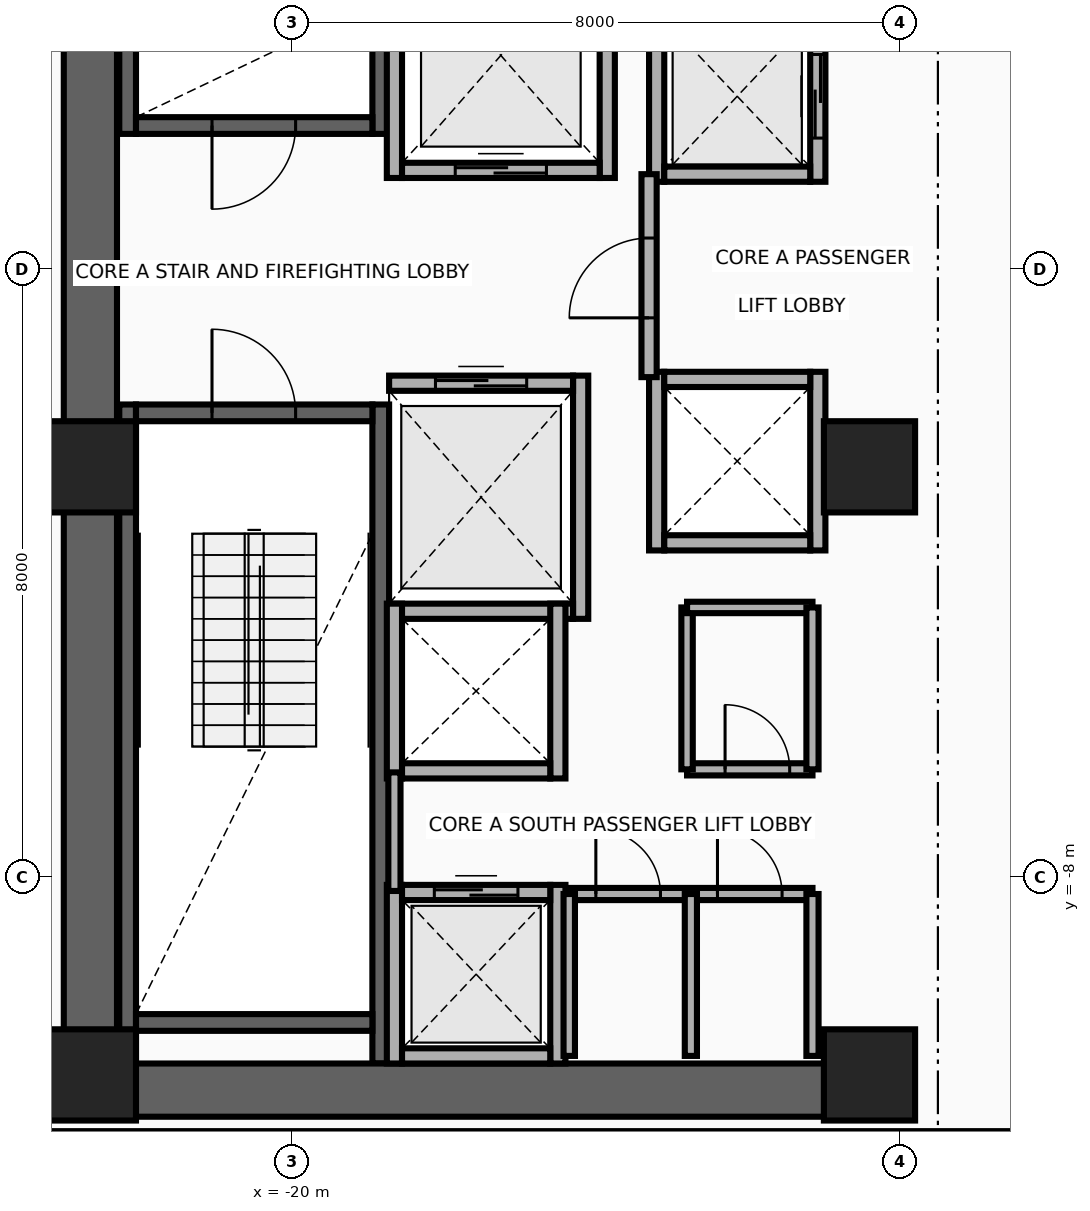
"""IFC4 building model, lengths in metres.
Left out: names, types, materials, properties, quantities, classifications, styles, units other than length and angle.
Written with IfcOpenShell. Run it as: python <this file> out.ifc"""

import sys

from ifc_helpers import new_model, si_unit, direction, frame, frame_2d, origin, origin_2d, place, context, subcontext, project, spatial, rectangle, extrude, source, transform, mapped, element, fill, save


model = new_model("IFC4")
c1 = context("Model", 3, precision=1e-05, world=origin(), true_north=direction((0.0, 1.0)))
c2 = subcontext(c1, "Body", "Model", "MODEL_VIEW")
j1 = project(units=[si_unit("LENGTHUNIT", "METRE"), si_unit("PLANEANGLEUNIT", "RADIAN")], contexts=[c1])
p1 = place(None, origin())
s1 = spatial("IfcSite", under=j1, at=p1, CompositionType="ELEMENT")
p2 = place(p1, origin())
s2 = spatial("IfcBuilding", under=s1, at=p2, CompositionType="ELEMENT")
p3 = place(p2, frame((0.0, 0.0, 124.2)))
s3 = spatial("IfcBuildingStorey", under=s2, at=p3, CompositionType="ELEMENT", Elevation=124.2)
for number, where, z_axis, x_axis in (
    (1, (-22.16, 1.78, 0.0), (0.0, 0.0, 1.0), (0.0, 1.0, 0.0)),
    (2, (-18.83, 1.78, 0.0), (0.0, 0.0, 1.0), (0.0, 1.0, 0.0)),
):
    element("IfcWall", number, at=place(p3, frame(where, z_axis=z_axis, x_axis=x_axis)), inside=s3, PredefinedType="SHEAR", context=c2, shape_type="SweptSolid", body=[
        extrude(rectangle(XDim=8.67, YDim=0.22, at=frame_2d((4.335, 0.0))), origin(), (0.0, 0.0, 1.0), 3.46),
    ])
p4 = place(p3, frame((-22.05, 1.89, 0.0), z_axis=(0.0, 0.0, 1.0), x_axis=(1.0, 0.0, 0.0)))
e3 = element("IfcWall", 3, at=p4, inside=s3, PredefinedType="SHEAR", context=c2, shape_type="SweptSolid", body=[
    extrude(rectangle(XDim=3.11, YDim=0.22, at=frame_2d((1.555, 0.0))), origin(), (0.0, 0.0, 1.0), 3.46),
])
p5 = place(p4, frame((1.0, 0.0, 0.0)))
e4 = element("IfcOpeningElement", 4, at=p5, cuts=e3, PredefinedType="OPENING", context=c2, shape_type="SweptSolid", body=[
    extrude(rectangle(XDim=1.1, YDim=2.15, at=frame_2d((0.55, 1.075))), frame((0.0, 0.125, 0.0), z_axis=(0.0, -1.0, 0.0), x_axis=(1.0, 0.0, 0.0)), (0.0, 0.0, 1.0), 0.25),
])
for number, where, z_axis, x_axis in (
    (5, (-22.16, -10.45, 0.0), (0.0, 0.0, 1.0), (0.0, 1.0, 0.0)),
    (6, (-18.83, -10.45, 0.0), (0.0, 0.0, 1.0), (0.0, 1.0, 0.0)),
):
    element("IfcWall", number, at=place(p3, frame(where, z_axis=z_axis, x_axis=x_axis)), inside=s3, PredefinedType="SHEAR", context=c2, shape_type="SweptSolid", body=[
        extrude(rectangle(XDim=8.67, YDim=0.22, at=frame_2d((4.335, 0.0))), origin(), (0.0, 0.0, 1.0), 3.46),
    ])
p6 = place(p3, frame((-22.05, -9.91, 0.0), z_axis=(0.0, 0.0, 1.0), x_axis=(1.0, 0.0, 0.0)))
e7 = element("IfcWall", 7, at=p6, inside=s3, PredefinedType="SHEAR", context=c2, shape_type="SweptSolid", body=[
    extrude(rectangle(XDim=3.11, YDim=0.22, at=frame_2d((1.555, 0.0))), origin(), (0.0, 0.0, 1.0), 3.46),
])
p7 = place(p3, frame((-22.05, -1.89, 0.0), z_axis=(0.0, 0.0, 1.0), x_axis=(1.0, 0.0, 0.0)))
e8 = element("IfcWall", 8, at=p7, inside=s3, PredefinedType="SHEAR", context=c2, shape_type="SweptSolid", body=[
    extrude(rectangle(XDim=3.11, YDim=0.22, at=frame_2d((1.555, 0.0))), origin(), (0.0, 0.0, 1.0), 3.46),
])
p8 = place(p7, frame((1.0, 0.0, 0.0)))
e9 = element("IfcOpeningElement", 9, at=p8, cuts=e8, PredefinedType="OPENING", context=c2, shape_type="SweptSolid", body=[
    extrude(rectangle(XDim=1.1, YDim=2.15, at=frame_2d((0.55, 1.075))), frame((0.0, 0.125, 0.0), z_axis=(0.0, -1.0, 0.0), x_axis=(1.0, 0.0, 0.0)), (0.0, 0.0, 1.0), 0.25),
])
p9 = place(p3, frame((-22.65, -11.15, 0.0), z_axis=(0.0, 0.0, 1.0), x_axis=(0.0, 1.0, 0.0)))
e10 = element("IfcWall", 10, at=p9, inside=s3, PredefinedType="SHEAR", context=c2, shape_type="SweptSolid", body=[
    extrude(rectangle(XDim=22.3, YDim=0.7, at=frame_2d((11.15, 0.0))), origin(), (0.0, 0.0, 1.0), 3.46),
])
p10 = place(p3, frame((-22.65, -10.8, 0.0), z_axis=(0.0, 0.0, 1.0), x_axis=(1.0, 0.0, 0.0)))
e11 = element("IfcWall", 11, at=p10, inside=s3, PredefinedType="SHEAR", context=c2, shape_type="SweptSolid", body=[
    extrude(rectangle(XDim=10.25, YDim=0.7, at=frame_2d((5.125, 0.0))), origin(), (0.0, 0.0, 1.0), 3.46),
])
m1 = source(origin(), c2, "Body", "SweptSolid", [
    extrude(rectangle(XDim=1.2, YDim=1.2, at=origin_2d()), origin(), (0.0, 0.0, 1.0), 3.7),
])
for number, where, z_axis, x_axis in (
    (12, (-22.65, -10.6, 0.0), (0.0, 0.0, 1.0), (1.0, 0.0, 0.0)),
    (13, (-12.4, -10.6, 0.0), (0.0, 0.0, 1.0), (1.0, 0.0, 0.0)),
    (14, (-22.65, -2.6, 0.0), (0.0, 0.0, 1.0), (1.0, 0.0, 0.0)),
    (15, (-12.4, -2.6, 0.0), (0.0, 0.0, 1.0), (1.0, 0.0, 0.0)),
):
    element("IfcColumn", number, at=place(p3, frame(where, z_axis=z_axis, x_axis=x_axis)), inside=s3, PredefinedType="COLUMN", context=c2, shape_type="MappedRepresentation", body=[
        mapped(m1, transform((0.0, 0.0, 0.0), x_axis=(1.0, 0.0, 0.0), y_axis=(0.0, 1.0, 0.0), z_axis=(0.0, 0.0, 1.0), scale=1.0)),
    ])
for number, where, z_axis, x_axis in (
    (16, (-18.65, 1.2, 0.0), (0.0, 0.0, 1.0), (0.0, 1.0, 0.0)),
    (17, (-15.85, 1.2, 0.0), (0.0, 0.0, 1.0), (0.0, 1.0, 0.0)),
):
    element("IfcWall", number, at=place(p3, frame(where, z_axis=z_axis, x_axis=x_axis)), inside=s3, PredefinedType="MOVABLE", context=c2, shape_type="SweptSolid", body=[
        extrude(rectangle(XDim=3.225, YDim=0.2, at=frame_2d((1.613, 0.0))), origin(), (0.0, 0.0, 1.0), 3.46),
    ])
p11 = place(p3, frame((-18.55, 1.3, 0.0), z_axis=(0.0, 0.0, 1.0), x_axis=(1.0, 0.0, 0.0)))
e18 = element("IfcWall", 18, at=p11, inside=s3, PredefinedType="MOVABLE", context=c2, shape_type="SweptSolid", body=[
    extrude(rectangle(XDim=2.6, YDim=0.2, at=frame_2d((1.3, 0.0))), origin(), (0.0, 0.0, 1.0), 3.46),
])
p12 = place(p11, frame((0.7, 0.0, 0.0)))
e19 = element("IfcOpeningElement", 19, at=p12, cuts=e18, PredefinedType="OPENING", context=c2, shape_type="SweptSolid", body=[
    extrude(rectangle(XDim=1.2, YDim=2.1, at=frame_2d((0.6, 1.05))), frame((0.0, 0.115, 0.0), z_axis=(0.0, -1.0, 0.0), x_axis=(1.0, 0.0, 0.0)), (0.0, 0.0, 1.0), 0.23),
])
p13 = place(p3, frame((-16.2, -4.6, 0.0), z_axis=(0.0, 0.0, 1.0), x_axis=(0.0, 1.0, 0.0)))
e20 = element("IfcWall", 20, at=p13, inside=s3, PredefinedType="MOVABLE", context=c2, shape_type="SweptSolid", body=[
    extrude(rectangle(XDim=3.2, YDim=0.2, at=frame_2d((1.6, 0.0))), origin(), (0.0, 0.0, 1.0), 3.46),
])
p14 = place(p3, frame((-18.72, -4.5, 0.0), z_axis=(0.0, 0.0, 1.0), x_axis=(1.0, 0.0, 0.0)))
e21 = element("IfcWall", 21, at=p14, inside=s3, PredefinedType="MOVABLE", context=c2, shape_type="SweptSolid", body=[
    extrude(rectangle(XDim=2.42, YDim=0.2, at=frame_2d((1.21, 0.0))), origin(), (0.0, 0.0, 1.0), 3.46),
])
p15 = place(p3, frame((-18.72, -1.5, 0.0), z_axis=(0.0, 0.0, 1.0), x_axis=(1.0, 0.0, 0.0)))
e22 = element("IfcWall", 22, at=p15, inside=s3, PredefinedType="MOVABLE", context=c2, shape_type="SweptSolid", body=[
    extrude(rectangle(XDim=2.42, YDim=0.2, at=frame_2d((1.21, 0.0))), origin(), (0.0, 0.0, 1.0), 3.46),
])
p16 = place(p15, frame((0.61, 0.0, 0.0)))
e23 = element("IfcOpeningElement", 23, at=p16, cuts=e22, PredefinedType="OPENING", context=c2, shape_type="SweptSolid", body=[
    extrude(rectangle(XDim=1.2, YDim=2.1, at=frame_2d((0.6, 1.05))), frame((0.0, 0.115, 0.0), z_axis=(0.0, -1.0, 0.0), x_axis=(1.0, 0.0, 0.0)), (0.0, 0.0, 1.0), 0.23),
])
for number, where, z_axis, x_axis in (
    (24, (-18.65, -10.45, 0.0), (0.0, 0.0, 1.0), (0.0, 1.0, 0.0)),
    (25, (-16.5, -10.45, 0.0), (0.0, 0.0, 1.0), (0.0, 1.0, 0.0)),
):
    element("IfcWall", number, at=place(p3, frame(where, z_axis=z_axis, x_axis=x_axis)), inside=s3, PredefinedType="MOVABLE", context=c2, shape_type="SweptSolid", body=[
        extrude(rectangle(XDim=2.35, YDim=0.2, at=frame_2d((1.175, 0.0))), origin(), (0.0, 0.0, 1.0), 2.666),
    ])
p17 = place(p3, frame((-18.55, -10.35, 0.0), z_axis=(0.0, 0.0, 1.0), x_axis=(1.0, 0.0, 0.0)))
e26 = element("IfcWall", 26, at=p17, inside=s3, PredefinedType="MOVABLE", context=c2, shape_type="SweptSolid", body=[
    extrude(rectangle(XDim=1.95, YDim=0.2, at=frame_2d((0.975, 0.0))), origin(), (0.0, 0.0, 1.0), 2.666),
])
p18 = place(p3, frame((-18.55, -8.2, 0.0), z_axis=(0.0, 0.0, 1.0), x_axis=(1.0, 0.0, 0.0)))
e27 = element("IfcWall", 27, at=p18, inside=s3, PredefinedType="MOVABLE", context=c2, shape_type="SweptSolid", body=[
    extrude(rectangle(XDim=1.95, YDim=0.2, at=frame_2d((0.975, 0.0))), origin(), (0.0, 0.0, 1.0), 3.46),
])
p19 = place(p18, frame((0.425, 0.0, 0.0)))
e28 = element("IfcOpeningElement", 28, at=p19, cuts=e27, PredefinedType="OPENING", context=c2, shape_type="SweptSolid", body=[
    extrude(rectangle(XDim=1.1, YDim=2.1, at=frame_2d((0.55, 1.05))), frame((0.0, 0.115, 0.0), z_axis=(0.0, -1.0, 0.0), x_axis=(1.0, 0.0, 0.0)), (0.0, 0.0, 1.0), 0.23),
])
p20 = place(p3, frame((-15.2, 1.15, 0.0), z_axis=(0.0, 0.0, 1.0), x_axis=(0.0, 1.0, 0.0)))
e29 = element("IfcWall", 29, at=p20, inside=s3, PredefinedType="MOVABLE", context=c2, shape_type="SweptSolid", body=[
    extrude(rectangle(XDim=2.25, YDim=0.2, at=frame_2d((1.125, 0.0))), origin(), (0.0, 0.0, 1.0), 3.46),
])
p21 = place(p3, frame((-13.08, 1.15, 0.0), z_axis=(0.0, 0.0, 1.0), x_axis=(0.0, 1.0, 0.0)))
e30 = element("IfcWall", 30, at=p21, inside=s3, PredefinedType="MOVABLE", context=c2, shape_type="SweptSolid", body=[
    extrude(rectangle(XDim=2.25, YDim=0.2, at=frame_2d((1.125, 0.0))), origin(), (0.0, 0.0, 1.0), 3.46),
])
p22 = place(p21, frame((0.575, 0.0, 0.0)))
e31 = element("IfcOpeningElement", 31, at=p22, cuts=e30, PredefinedType="OPENING", context=c2, shape_type="SweptSolid", body=[
    extrude(rectangle(XDim=1.1, YDim=2.1, at=frame_2d((0.55, 1.05))), frame((0.0, 0.115, 0.0), z_axis=(0.0, -1.0, 0.0), x_axis=(1.0, 0.0, 0.0)), (0.0, 0.0, 1.0), 0.23),
])
p23 = place(p3, frame((-15.1, 1.25, 0.0), z_axis=(0.0, 0.0, 1.0), x_axis=(1.0, 0.0, 0.0)))
e32 = element("IfcWall", 32, at=p23, inside=s3, PredefinedType="MOVABLE", context=c2, shape_type="SweptSolid", body=[
    extrude(rectangle(XDim=1.92, YDim=0.2, at=frame_2d((0.96, 0.0))), origin(), (0.0, 0.0, 1.0), 3.46),
])
for number, where, z_axis, x_axis in (
    (33, (-18.65, -6.7, 0.0), (0.0, 0.0, 1.0), (0.0, 1.0, 0.0)),
    (34, (-16.5, -6.7, 0.0), (0.0, 0.0, 1.0), (0.0, 1.0, 0.0)),
):
    element("IfcWall", number, at=place(p3, frame(where, z_axis=z_axis, x_axis=x_axis)), inside=s3, PredefinedType="MOVABLE", context=c2, shape_type="SweptSolid", body=[
        extrude(rectangle(XDim=2.3, YDim=0.2, at=frame_2d((1.15, 0.0))), origin(), (0.0, 0.0, 1.0), 3.46),
    ])
p24 = place(p3, frame((-18.55, -6.6, 0.0), z_axis=(0.0, 0.0, 1.0), x_axis=(1.0, 0.0, 0.0)))
e35 = element("IfcWall", 35, at=p24, inside=s3, PredefinedType="MOVABLE", context=c2, shape_type="SweptSolid", body=[
    extrude(rectangle(XDim=1.95, YDim=0.2, at=frame_2d((0.975, 0.0))), origin(), (0.0, 0.0, 1.0), 3.46),
])
for number, where, z_axis, x_axis in (
    (36, (-15.2, -3.7, 0.0), (0.0, 0.0, 1.0), (0.0, 1.0, 0.0)),
    (37, (-13.08, -3.7, 0.0), (0.0, 0.0, 1.0), (0.0, 1.0, 0.0)),
):
    element("IfcWall", number, at=place(p3, frame(where, z_axis=z_axis, x_axis=x_axis)), inside=s3, PredefinedType="MOVABLE", context=c2, shape_type="SweptSolid", body=[
        extrude(rectangle(XDim=2.35, YDim=0.2, at=frame_2d((1.175, 0.0))), origin(), (0.0, 0.0, 1.0), 3.46),
    ])
for number, where, z_axis, x_axis in (
    (38, (-15.1, -3.6, 0.0), (0.0, 0.0, 1.0), (1.0, 0.0, 0.0)),
    (39, (-15.1, -1.45, 0.0), (0.0, 0.0, 1.0), (1.0, 0.0, 0.0)),
):
    element("IfcWall", number, at=place(p3, frame(where, z_axis=z_axis, x_axis=x_axis)), inside=s3, PredefinedType="MOVABLE", context=c2, shape_type="SweptSolid", body=[
        extrude(rectangle(XDim=1.92, YDim=0.2, at=frame_2d((0.96, 0.0))), origin(), (0.0, 0.0, 1.0), 3.46),
    ])
p25 = place(p3, frame((-15.3, -1.42, 0.0), z_axis=(0.0, 0.0, 1.0), x_axis=(0.0, 1.0, 0.0)))
e40 = element("IfcWall", 40, at=p25, inside=s3, PredefinedType="PARTITIONING", context=c2, shape_type="SweptSolid", body=[
    extrude(rectangle(XDim=2.67, YDim=0.2, at=frame_2d((1.335, 0.0))), origin(), (0.0, 0.0, 1.0), 3.46),
])
p26 = place(p25, frame((0.78, 0.0, 0.0)))
e41 = element("IfcOpeningElement", 41, at=p26, cuts=e40, PredefinedType="OPENING", context=c2, shape_type="SweptSolid", body=[
    extrude(rectangle(XDim=1.05, YDim=2.15, at=frame_2d((0.525, 1.075))), frame((0.0, 0.115, 0.0), z_axis=(0.0, -1.0, 0.0), x_axis=(1.0, 0.0, 0.0)), (0.0, 0.0, 1.0), 0.23),
])
p27 = place(p3, frame((-18.65, -8.18, 0.0), z_axis=(0.0, 0.0, 1.0), x_axis=(0.0, 1.0, 0.0)))
e42 = element("IfcWall", 42, at=p27, inside=s3, PredefinedType="PARTITIONING", context=c2, shape_type="SweptSolid", body=[
    extrude(rectangle(XDim=1.56, YDim=0.16, at=frame_2d((0.78, 0.0))), origin(), (0.0, 0.0, 1.0), 3.46),
])
p28 = place(p3, frame((-16.35, -8.22, 0.0), z_axis=(0.0, 0.0, 1.0), x_axis=(1.0, 0.0, 0.0)))
e43 = element("IfcWall", 43, at=p28, inside=s3, PredefinedType="PARTITIONING", context=c2, shape_type="SweptSolid", body=[
    extrude(rectangle(XDim=3.2, YDim=0.16, at=frame_2d((1.6, 0.0))), origin(), (0.0, 0.0, 1.0), 3.46),
])
p29 = place(p28, frame((0.35, 0.0, 0.0)))
e44 = element("IfcOpeningElement", 44, at=p29, cuts=e43, PredefinedType="OPENING", context=c2, shape_type="SweptSolid", body=[
    extrude(rectangle(XDim=0.85, YDim=2.05, at=frame_2d((0.425, 1.025))), frame((0.0, 0.095, 0.0), z_axis=(0.0, -1.0, 0.0), x_axis=(1.0, 0.0, 0.0)), (0.0, 0.0, 1.0), 0.19),
])
p30 = place(p28, frame((1.95, 0.0, 0.0)))
e45 = element("IfcOpeningElement", 45, at=p30, cuts=e43, PredefinedType="OPENING", context=c2, shape_type="SweptSolid", body=[
    extrude(rectangle(XDim=0.85, YDim=2.05, at=frame_2d((0.425, 1.025))), frame((0.0, 0.095, 0.0), z_axis=(0.0, -1.0, 0.0), x_axis=(1.0, 0.0, 0.0)), (0.0, 0.0, 1.0), 0.19),
])
p31 = place(p3, frame((-16.35, -10.35, 0.0), z_axis=(0.0, 0.0, 1.0), x_axis=(0.0, 1.0, 0.0)))
e46 = element("IfcWall", 46, at=p31, inside=s3, PredefinedType="PARTITIONING", context=c2, shape_type="SweptSolid", body=[
    extrude(rectangle(XDim=2.13, YDim=0.15, at=frame_2d((1.065, 0.0))), origin(), (0.0, 0.0, 1.0), 3.46),
])
for number, where, z_axis, x_axis in (
    (47, (-13.15, -10.35, 0.0), (0.0, 0.0, 1.0), (0.0, 1.0, 0.0)),
    (48, (-14.75, -10.35, 0.0), (0.0, 0.0, 1.0), (0.0, 1.0, 0.0)),
):
    element("IfcWall", number, at=place(p3, frame(where, z_axis=z_axis, x_axis=x_axis)), inside=s3, PredefinedType="PARTITIONING", context=c2, shape_type="SweptSolid", body=[
        extrude(rectangle(XDim=2.13, YDim=0.16, at=frame_2d((1.065, 0.0))), origin(), (0.0, 0.0, 1.0), 3.46),
    ])
p32 = place(p3, frame((-14.8, -6.58, 0.0), z_axis=(0.0, 0.0, 1.0), x_axis=(1.0, 0.0, 0.0)))
e49 = element("IfcWall", 49, at=p32, inside=s3, PredefinedType="PARTITIONING", context=c2, shape_type="SweptSolid", body=[
    extrude(rectangle(XDim=1.65, YDim=0.16, at=frame_2d((0.825, 0.0))), origin(), (0.0, 0.0, 1.0), 3.46),
])
p33 = place(p32, frame((0.5, 0.0, 0.0)))
e50 = element("IfcOpeningElement", 50, at=p33, cuts=e49, PredefinedType="OPENING", context=c2, shape_type="SweptSolid", body=[
    extrude(rectangle(XDim=0.85, YDim=2.05, at=frame_2d((0.425, 1.025))), frame((0.0, 0.095, 0.0), z_axis=(0.0, -1.0, 0.0), x_axis=(1.0, 0.0, 0.0)), (0.0, 0.0, 1.0), 0.19),
])
p34 = place(p3, frame((-14.8, -6.58, 0.0), z_axis=(0.0, 0.0, 1.0), x_axis=(0.0, 1.0, 0.0)))
e51 = element("IfcWall", 51, at=p34, inside=s3, PredefinedType="PARTITIONING", context=c2, shape_type="SweptSolid", body=[
    extrude(rectangle(XDim=2.13, YDim=0.15, at=frame_2d((1.065, 0.0))), origin(), (0.0, 0.0, 1.0), 3.46),
])
p35 = place(p3, frame((-14.8, -4.45, 0.0), z_axis=(0.0, 0.0, 1.0), x_axis=(1.0, 0.0, 0.0)))
e52 = element("IfcWall", 52, at=p35, inside=s3, PredefinedType="PARTITIONING", context=c2, shape_type="SweptSolid", body=[
    extrude(rectangle(XDim=1.65, YDim=0.15, at=frame_2d((0.825, 0.0))), origin(), (0.0, 0.0, 1.0), 3.46),
])
p36 = place(p3, frame((-13.15, -6.58, 0.0), z_axis=(0.0, 0.0, 1.0), x_axis=(0.0, 1.0, 0.0)))
e53 = element("IfcWall", 53, at=p36, inside=s3, PredefinedType="PARTITIONING", context=c2, shape_type="SweptSolid", body=[
    extrude(rectangle(XDim=2.13, YDim=0.16, at=frame_2d((1.065, 0.0))), origin(), (0.0, 0.0, 1.0), 3.46),
])
p37 = place(p3, frame((-23.45, -11.42, 0.0), z_axis=(0.0, 0.0, 1.0), x_axis=(1.0, 0.0, 0.0)))
e54 = element("IfcWall", 54, at=p37, inside=s3, PredefinedType="PARTITIONING", context=c2, shape_type="SweptSolid", body=[
    extrude(rectangle(XDim=13.84, YDim=0.16, at=frame_2d((6.92, 0.0))), origin(), (0.0, 0.0, 1.0), 2.834),
])
p38 = place(p12, origin())
e55 = element("IfcDoor", 55, at=p38, inside=s3, OperationType="DOUBLE_DOOR_SLIDING", PredefinedType="DOOR", context=c2, shape_type="SweptSolid", body=[
    extrude(rectangle(XDim=1.2, YDim=2.1, at=frame_2d((0.6, 1.05))), frame((0.0, 0.025, 0.0), z_axis=(0.0, -1.0, 0.0), x_axis=(1.0, 0.0, 0.0)), (0.0, 0.0, 1.0), 0.05),
])
fill(e19, e55)
p39 = place(p16, origin())
e56 = element("IfcDoor", 56, at=p39, inside=s3, OperationType="DOUBLE_DOOR_SLIDING", PredefinedType="DOOR", context=c2, shape_type="SweptSolid", body=[
    extrude(rectangle(XDim=1.2, YDim=2.1, at=frame_2d((0.6, 1.05))), frame((0.0, 0.025, 0.0), z_axis=(0.0, -1.0, 0.0), x_axis=(1.0, 0.0, 0.0)), (0.0, 0.0, 1.0), 0.05),
])
fill(e23, e56)
p40 = place(p19, origin())
e57 = element("IfcDoor", 57, at=p40, inside=s3, OperationType="DOUBLE_DOOR_SLIDING", PredefinedType="DOOR", context=c2, shape_type="SweptSolid", body=[
    extrude(rectangle(XDim=1.1, YDim=2.1, at=frame_2d((0.55, 1.05))), frame((0.0, 0.025, 0.0), z_axis=(0.0, -1.0, 0.0), x_axis=(1.0, 0.0, 0.0)), (0.0, 0.0, 1.0), 0.05),
])
fill(e28, e57)
p41 = place(p22, origin())
e58 = element("IfcDoor", 58, at=p41, inside=s3, OperationType="DOUBLE_DOOR_SLIDING", PredefinedType="DOOR", context=c2, shape_type="SweptSolid", body=[
    extrude(rectangle(XDim=1.1, YDim=2.1, at=frame_2d((0.55, 1.05))), frame((0.0, 0.025, 0.0), z_axis=(0.0, -1.0, 0.0), x_axis=(1.0, 0.0, 0.0)), (0.0, 0.0, 1.0), 0.05),
])
fill(e31, e58)
p42 = place(p26, origin())
e59 = element("IfcDoor", 59, at=p42, inside=s3, OperationType="SINGLE_SWING_RIGHT", PredefinedType="DOOR", context=c2, shape_type="SweptSolid", body=[
    extrude(rectangle(XDim=1.05, YDim=2.15, at=frame_2d((0.525, 1.075))), frame((0.0, 0.025, 0.0), z_axis=(0.0, -1.0, 0.0), x_axis=(1.0, 0.0, 0.0)), (0.0, 0.0, 1.0), 0.05),
])
fill(e41, e59)
p43 = place(p5, frame((1.1, 0.0, 0.0), z_axis=(0.0, 0.0, 1.0), x_axis=(-1.0, 0.0, 0.0)))
e60 = element("IfcDoor", 60, at=p43, inside=s3, OperationType="SINGLE_SWING_LEFT", PredefinedType="DOOR", context=c2, shape_type="SweptSolid", body=[
    extrude(rectangle(XDim=1.1, YDim=2.15, at=frame_2d((0.55, 1.075))), frame((0.0, 0.025, 0.0), z_axis=(0.0, -1.0, 0.0), x_axis=(1.0, 0.0, 0.0)), (0.0, 0.0, 1.0), 0.05),
])
fill(e4, e60)
p44 = place(p8, origin())
e61 = element("IfcDoor", 61, at=p44, inside=s3, OperationType="SINGLE_SWING_RIGHT", PredefinedType="DOOR", context=c2, shape_type="SweptSolid", body=[
    extrude(rectangle(XDim=1.1, YDim=2.15, at=frame_2d((0.55, 1.075))), frame((0.0, 0.025, 0.0), z_axis=(0.0, -1.0, 0.0), x_axis=(1.0, 0.0, 0.0)), (0.0, 0.0, 1.0), 0.05),
])
fill(e9, e61)
p45 = place(p29, origin())
e62 = element("IfcDoor", 62, at=p45, inside=s3, OperationType="SINGLE_SWING_LEFT", PredefinedType="DOOR", context=c2, shape_type="SweptSolid", body=[
    extrude(rectangle(XDim=0.85, YDim=2.05, at=frame_2d((0.425, 1.025))), frame((0.0, 0.025, 0.0), z_axis=(0.0, -1.0, 0.0), x_axis=(1.0, 0.0, 0.0)), (0.0, 0.0, 1.0), 0.05),
])
fill(e44, e62)
p46 = place(p30, origin())
e63 = element("IfcDoor", 63, at=p46, inside=s3, OperationType="SINGLE_SWING_RIGHT", PredefinedType="DOOR", context=c2, shape_type="SweptSolid", body=[
    extrude(rectangle(XDim=0.85, YDim=2.05, at=frame_2d((0.425, 1.025))), frame((0.0, 0.025, 0.0), z_axis=(0.0, -1.0, 0.0), x_axis=(1.0, 0.0, 0.0)), (0.0, 0.0, 1.0), 0.05),
])
fill(e45, e63)
p47 = place(p33, origin())
e64 = element("IfcDoor", 64, at=p47, inside=s3, OperationType="SINGLE_SWING_LEFT", PredefinedType="DOOR", context=c2, shape_type="SweptSolid", body=[
    extrude(rectangle(XDim=0.85, YDim=2.05, at=frame_2d((0.425, 1.025))), frame((0.0, 0.025, 0.0), z_axis=(0.0, -1.0, 0.0), x_axis=(1.0, 0.0, 0.0)), (0.0, 0.0, 1.0), 0.05),
])
fill(e50, e64)
save(model, sys.argv[1])
